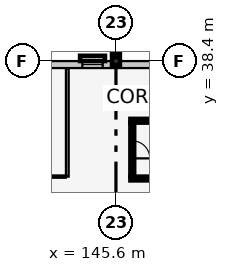
"""IFC4 building model, lengths in metres.
Left out: names, types, materials, properties, quantities, classifications, styles, units other than length and angle.
Written with IfcOpenShell. Run it as: python <this file> out.ifc"""

import sys

from ifc_helpers import new_model, si_unit, direction, frame, frame_2d, origin, origin_2d, place, context, subcontext, project, spatial, rectangle, extrude, element, fill, save


model = new_model("IFC4")
c1 = context("Model", 3, precision=1e-05, world=origin(), true_north=direction((0.0, 1.0)))
c2 = subcontext(c1, "Body", "Model", "MODEL_VIEW")
j1 = project(units=[si_unit("LENGTHUNIT", "METRE"), si_unit("PLANEANGLEUNIT", "RADIAN")], contexts=[c1])
p1 = place(None, origin())
s1 = spatial("IfcSite", under=j1, at=p1, CompositionType="ELEMENT")
p2 = place(p1, origin())
s2 = spatial("IfcBuilding", under=s1, at=p2, CompositionType="ELEMENT")
p3 = place(p2, frame((0.0, 0.0, 5.4)))
s3 = spatial("IfcBuildingStorey", under=s2, at=p3, CompositionType="ELEMENT", Elevation=5.4)
for number, where, z_axis, x_axis in (
    (1, (145.6, 38.4, 0.0), (0.0, 0.0, 1.0), (1.0, 0.0, 0.0)),
    (2, (145.6, 39.2, 0.0), (0.0, 0.0, 1.0), (1.0, 0.0, 0.0)),
):
    element("IfcColumn", number, at=place(p3, frame(where, z_axis=z_axis, x_axis=x_axis)), inside=s3, PredefinedType="COLUMN", context=c2, shape_type="SweptSolid", body=[
        extrude(rectangle(XDim=0.52, YDim=0.52, at=origin_2d()), origin(), (0.0, 0.0, 1.0), 4.2),
    ])
p4 = place(p3, frame((124.0, 38.17, 0.0), z_axis=(0.0, 0.0, 1.0), x_axis=(1.0, 0.0, 0.0)))
e3 = element("IfcWall", 3, at=p4, inside=s3, PredefinedType="SOLIDWALL", context=c2, shape_type="SweptSolid", body=[
    extrude(rectangle(XDim=62.0, YDim=0.46, at=frame_2d((31.0, 0.0))), origin(), (0.0, 0.0, 1.0), 3.095),
])
p5 = place(p4, frame((1.134, 0.0, 0.9)))
e4 = element("IfcOpeningElement", 4, at=p5, cuts=e3, PredefinedType="OPENING", context=c2, shape_type="SweptSolid", body=[
    extrude(rectangle(XDim=1.38, YDim=1.6, at=frame_2d((0.69, 0.8))), frame((0.0, 0.242, 0.0), z_axis=(0.0, -1.0, 0.0), x_axis=(1.0, 0.0, 0.0)), (0.0, 0.0, 1.0), 0.484),
])
p6 = place(p4, frame((4.721, 0.0, 0.9)))
e5 = element("IfcOpeningElement", 5, at=p6, cuts=e3, PredefinedType="OPENING", context=c2, shape_type="SweptSolid", body=[
    extrude(rectangle(XDim=1.5, YDim=1.6, at=frame_2d((0.75, 0.8))), frame((0.0, 0.242, 0.0), z_axis=(0.0, -1.0, 0.0), x_axis=(1.0, 0.0, 0.0)), (0.0, 0.0, 1.0), 0.484),
])
p7 = place(p4, frame((12.205, 0.0, 0.9)))
e6 = element("IfcOpeningElement", 6, at=p7, cuts=e3, PredefinedType="OPENING", context=c2, shape_type="SweptSolid", body=[
    extrude(rectangle(XDim=1.12, YDim=1.75, at=frame_2d((0.56, 0.875))), frame((0.0, 0.242, 0.0), z_axis=(0.0, -1.0, 0.0), x_axis=(1.0, 0.0, 0.0)), (0.0, 0.0, 1.0), 0.484),
])
p8 = place(p4, frame((15.792, 0.0, 0.9)))
e7 = element("IfcOpeningElement", 7, at=p8, cuts=e3, PredefinedType="OPENING", context=c2, shape_type="SweptSolid", body=[
    extrude(rectangle(XDim=1.24, YDim=1.75, at=frame_2d((0.62, 0.875))), frame((0.0, 0.242, 0.0), z_axis=(0.0, -1.0, 0.0), x_axis=(1.0, 0.0, 0.0)), (0.0, 0.0, 1.0), 0.484),
])
p9 = place(p4, frame((19.389, 0.0, 0.9)))
e8 = element("IfcOpeningElement", 8, at=p9, cuts=e3, PredefinedType="OPENING", context=c2, shape_type="SweptSolid", body=[
    extrude(rectangle(XDim=1.34, YDim=1.75, at=frame_2d((0.67, 0.875))), frame((0.0, 0.242, 0.0), z_axis=(0.0, -1.0, 0.0), x_axis=(1.0, 0.0, 0.0)), (0.0, 0.0, 1.0), 0.484),
])
p10 = place(p4, frame((34.147, 0.0, 0.9)))
e9 = element("IfcOpeningElement", 9, at=p10, cuts=e3, PredefinedType="OPENING", context=c2, shape_type="SweptSolid", body=[
    extrude(rectangle(XDim=1.0, YDim=1.35, at=frame_2d((0.5, 0.675))), frame((0.0, 0.242, 0.0), z_axis=(0.0, -1.0, 0.0), x_axis=(1.0, 0.0, 0.0)), (0.0, 0.0, 1.0), 0.484),
])
p11 = place(p4, frame((37.744, 0.0, 0.9)))
e10 = element("IfcOpeningElement", 10, at=p11, cuts=e3, PredefinedType="OPENING", context=c2, shape_type="SweptSolid", body=[
    extrude(rectangle(XDim=1.1, YDim=1.35, at=frame_2d((0.55, 0.675))), frame((0.0, 0.242, 0.0), z_axis=(0.0, -1.0, 0.0), x_axis=(1.0, 0.0, 0.0)), (0.0, 0.0, 1.0), 0.484),
])
p12 = place(p4, frame((48.535, 0.0, 0.9)))
e11 = element("IfcOpeningElement", 11, at=p12, cuts=e3, PredefinedType="OPENING", context=c2, shape_type="SweptSolid", body=[
    extrude(rectangle(XDim=1.4, YDim=1.35, at=frame_2d((0.7, 0.675))), frame((0.0, 0.242, 0.0), z_axis=(0.0, -1.0, 0.0), x_axis=(1.0, 0.0, 0.0)), (0.0, 0.0, 1.0), 0.484),
])
p13 = place(p4, frame((59.602, 0.0, 0.9)))
e12 = element("IfcOpeningElement", 12, at=p13, cuts=e3, PredefinedType="OPENING", context=c2, shape_type="SweptSolid", body=[
    extrude(rectangle(XDim=1.15, YDim=1.45, at=frame_2d((0.575, 0.725))), frame((0.0, 0.242, 0.0), z_axis=(0.0, -1.0, 0.0), x_axis=(1.0, 0.0, 0.0)), (0.0, 0.0, 1.0), 0.484),
])
for number, where, z_axis, x_axis in (
    (13, (146.55, 30.675, 0.0), (0.0, 0.0, 1.0), (1.0, 0.0, 0.0)),
    (14, (155.45, 34.475, 0.0), (0.0, 0.0, 1.0), (-1.0, 0.0, 0.0)),
):
    element("IfcWall", number, at=place(p3, frame(where, z_axis=z_axis, x_axis=x_axis)), inside=s3, PredefinedType="SHEAR", context=c2, shape_type="SweptSolid", body=[
        extrude(rectangle(XDim=8.9, YDim=0.25, at=frame_2d((4.45, 0.0))), origin(), (0.0, 0.0, 1.0), 3.94),
    ])
p14 = place(p3, frame((146.675, 34.35, 0.0), z_axis=(0.0, 0.0, 1.0), x_axis=(0.0, -1.0, 0.0)))
e15 = element("IfcWall", 15, at=p14, inside=s3, PredefinedType="SHEAR", context=c2, shape_type="SweptSolid", body=[
    extrude(rectangle(XDim=3.55, YDim=0.25, at=frame_2d((1.775, 0.0))), origin(), (0.0, 0.0, 1.0), 3.94),
])
p15 = place(p14, frame((1.2, 0.0, 0.0)))
e16 = element("IfcOpeningElement", 16, at=p15, cuts=e15, PredefinedType="OPENING", context=c2, shape_type="SweptSolid", body=[
    extrude(rectangle(XDim=1.15, YDim=2.15, at=frame_2d((0.575, 1.075))), frame((0.0, 0.137, 0.0), z_axis=(0.0, -1.0, 0.0), x_axis=(1.0, 0.0, 0.0)), (0.0, 0.0, 1.0), 0.274),
])
p16 = place(p3, frame((142.4, 30.8, 0.0), z_axis=(0.0, 0.0, 1.0), x_axis=(0.0, 1.0, 0.0)))
e17 = element("IfcWall", 17, at=p16, inside=s3, PredefinedType="PARTITIONING", context=c2, shape_type="SweptSolid", body=[
    extrude(rectangle(XDim=7.13, YDim=0.18, at=frame_2d((3.565, 0.0))), origin(), (0.0, 0.0, 1.0), 3.94),
])
p17 = place(p3, frame((133.5, 30.8, 0.0), z_axis=(0.0, 0.0, 1.0), x_axis=(1.0, 0.0, 0.0)))
e18 = element("IfcWall", 18, at=p17, inside=s3, PredefinedType="PARTITIONING", context=c2, shape_type="SweptSolid", body=[
    extrude(rectangle(XDim=8.8, YDim=0.15, at=frame_2d((4.4, 0.0))), origin(), (0.0, 0.0, 1.0), 3.94),
])
p18 = place(p17, frame((3.76, 0.0, 0.0)))
e19 = element("IfcOpeningElement", 19, at=p18, cuts=e18, PredefinedType="OPENING", context=c2, shape_type="SweptSolid", body=[
    extrude(rectangle(XDim=1.28, YDim=2.2, at=frame_2d((0.64, 1.1))), frame((0.0, 0.087, 0.0), z_axis=(0.0, -1.0, 0.0), x_axis=(1.0, 0.0, 0.0)), (0.0, 0.0, 1.0), 0.174),
])
p19 = place(p9, origin())
e20 = element("IfcWindow", 20, at=p19, inside=s3, PartitioningType="SINGLE_PANEL", PredefinedType="WINDOW", context=c2, shape_type="SweptSolid", body=[
    extrude(rectangle(XDim=1.34, YDim=1.75, at=frame_2d((0.67, 0.875))), frame((0.0, 0.03, 0.0), z_axis=(0.0, -1.0, 0.0), x_axis=(1.0, 0.0, 0.0)), (0.0, 0.0, 1.0), 0.06),
])
fill(e8, e20)
p20 = place(p15, origin())
e21 = element("IfcDoor", 21, at=p20, inside=s3, OperationType="SINGLE_SWING_RIGHT", PredefinedType="DOOR", context=c2, shape_type="SweptSolid", body=[
    extrude(rectangle(XDim=1.15, YDim=2.15, at=frame_2d((0.575, 1.075))), frame((0.0, 0.025, 0.0), z_axis=(0.0, -1.0, 0.0), x_axis=(1.0, 0.0, 0.0)), (0.0, 0.0, 1.0), 0.05),
])
fill(e16, e21)
save(model, sys.argv[1])
